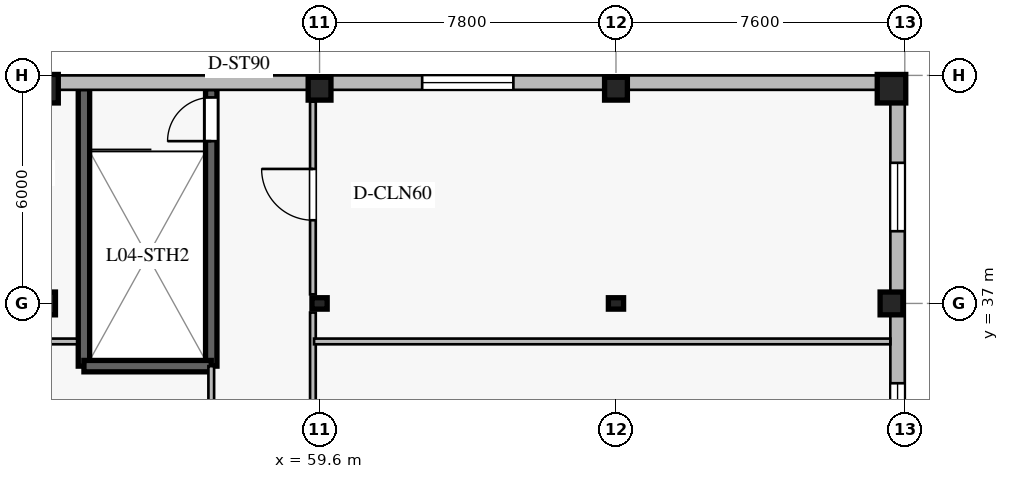
"""IFC4 building model, lengths in metres.
Left out: names, types, materials, properties, quantities, classifications, styles, units other than length and angle.
Written with IfcOpenShell. Run it as: python <this file> out.ifc"""

import sys

from ifc_helpers import new_model, si_unit, direction, frame, frame_2d, origin, origin_2d, place, context, subcontext, project, spatial, rectangle, i_section, extrude, element, fill, save


model = new_model("IFC4")
c1 = context("Model", 3, precision=1e-05, world=origin(), true_north=direction((0.0, 1.0)))
c2 = subcontext(c1, "Body", "Model", "MODEL_VIEW")
j1 = project(units=[si_unit("LENGTHUNIT", "METRE"), si_unit("PLANEANGLEUNIT", "RADIAN")], contexts=[c1])
p1 = place(None, origin())
s1 = spatial("IfcSite", under=j1, at=p1, CompositionType="ELEMENT")
p2 = place(p1, origin())
s2 = spatial("IfcBuilding", under=s1, at=p2, CompositionType="ELEMENT")
p3 = place(p2, frame((0.0, 0.0, 19.0)))
s3 = spatial("IfcBuildingStorey", under=s2, at=p3, CompositionType="ELEMENT", Elevation=19.0)
p4 = place(p3, frame((56.75, 35.35, 0.0), z_axis=(0.0, 0.0, 1.0), x_axis=(0.0, 1.0, 0.0)))
e1 = element("IfcWall", 1, at=p4, inside=s3, PredefinedType="SOLIDWALL", context=c2, shape_type="SweptSolid", body=[
    extrude(rectangle(XDim=7.3, YDim=0.3, at=frame_2d((3.65, 0.0))), origin(), (0.0, 0.0, 1.0), 4.73),
])
p5 = place(p4, frame((5.92, 0.0, 0.0)))
e2 = element("IfcOpeningElement", 2, at=p5, cuts=e1, PredefinedType="OPENING", context=c2, shape_type="SweptSolid", body=[
    extrude(rectangle(XDim=1.15, YDim=2.2, at=frame_2d((0.575, 1.1))), frame((0.0, 0.16, 0.0), z_axis=(0.0, -1.0, 0.0), x_axis=(1.0, 0.0, 0.0)), (0.0, 0.0, 1.0), 0.32),
])
p6 = place(p3, frame((53.4, 35.35, 0.0), z_axis=(0.0, 0.0, 1.0), x_axis=(0.0, 1.0, 0.0)))
e3 = element("IfcWall", 3, at=p6, inside=s3, PredefinedType="SOLIDWALL", context=c2, shape_type="SweptSolid", body=[
    extrude(rectangle(XDim=7.3, YDim=0.3, at=frame_2d((3.65, 0.0))), origin(), (0.0, 0.0, 1.0), 4.73),
])
p7 = place(p3, frame((53.4, 35.35, 0.0), z_axis=(0.0, 0.0, 1.0), x_axis=(1.0, 0.0, 0.0)))
e4 = element("IfcWall", 4, at=p7, inside=s3, PredefinedType="SOLIDWALL", context=c2, shape_type="SweptSolid", body=[
    extrude(rectangle(XDim=3.35, YDim=0.3, at=frame_2d((1.675, 0.0))), origin(), (0.0, 0.0, 1.0), 4.73),
])
p8 = place(p3, frame((52.35, 37.0, 0.0), z_axis=(0.0, 0.0, 1.0), x_axis=(1.0, 0.0, 0.0)))
e5 = element("IfcColumn", 5, at=p8, inside=s3, PredefinedType="COLUMN", context=c2, shape_type="SweptSolid", body=[
    extrude(rectangle(XDim=0.6, YDim=0.6, at=origin_2d()), origin(), (0.0, 0.0, 1.0), 4.77),
])
p9 = place(p3, frame((52.35, 42.65, 0.0), z_axis=(0.0, 0.0, 1.0), x_axis=(1.0, 0.0, 0.0)))
e6 = element("IfcColumn", 6, at=p9, inside=s3, PredefinedType="COLUMN", context=c2, shape_type="SweptSolid", body=[
    extrude(rectangle(XDim=0.75, YDim=0.75, at=origin_2d()), origin(), (0.0, 0.0, 1.0), 4.77),
])
p10 = place(p3, frame((59.6, 37.0, 0.0), z_axis=(0.0, 0.0, 1.0), x_axis=(1.0, 0.0, 0.0)))
e7 = element("IfcColumn", 7, at=p10, inside=s3, PredefinedType="COLUMN", context=c2, shape_type="SweptSolid", body=[
    extrude(i_section(OverallWidth=0.3, OverallDepth=0.4, WebThickness=0.013, FlangeThickness=0.024, at=origin_2d()), origin(), (0.0, 0.0, 1.0), 4.77),
])
p11 = place(p3, frame((59.6, 42.65, 0.0), z_axis=(0.0, 0.0, 1.0), x_axis=(1.0, 0.0, 0.0)))
e8 = element("IfcColumn", 8, at=p11, inside=s3, PredefinedType="COLUMN", context=c2, shape_type="SweptSolid", body=[
    extrude(rectangle(XDim=0.6, YDim=0.6, at=origin_2d()), origin(), (0.0, 0.0, 1.0), 4.77),
])
p12 = place(p3, frame((67.4, 37.0, 0.0), z_axis=(0.0, 0.0, 1.0), x_axis=(1.0, 0.0, 0.0)))
e9 = element("IfcColumn", 9, at=p12, inside=s3, PredefinedType="COLUMN", context=c2, shape_type="SweptSolid", body=[
    extrude(i_section(OverallWidth=0.3, OverallDepth=0.4, WebThickness=0.013, FlangeThickness=0.024, at=origin_2d()), origin(), (0.0, 0.0, 1.0), 4.77),
])
for number, where, z_axis, x_axis in (
    (10, (67.4, 42.65, 0.0), (0.0, 0.0, 1.0), (1.0, 0.0, 0.0)),
    (11, (74.65, 37.0, 0.0), (0.0, 0.0, 1.0), (1.0, 0.0, 0.0)),
):
    element("IfcColumn", number, at=place(p3, frame(where, z_axis=z_axis, x_axis=x_axis)), inside=s3, PredefinedType="COLUMN", context=c2, shape_type="SweptSolid", body=[
        extrude(rectangle(XDim=0.6, YDim=0.6, at=origin_2d()), origin(), (0.0, 0.0, 1.0), 4.77),
    ])
p13 = place(p3, frame((74.65, 42.65, 0.0), z_axis=(0.0, 0.0, 1.0), x_axis=(1.0, 0.0, 0.0)))
e12 = element("IfcColumn", 12, at=p13, inside=s3, PredefinedType="COLUMN", context=c2, shape_type="SweptSolid", body=[
    extrude(rectangle(XDim=0.75, YDim=0.75, at=origin_2d()), origin(), (0.0, 0.0, 1.0), 4.77),
])
p14 = place(p3, frame((52.0, 42.81, 0.0), z_axis=(0.0, 0.0, 1.0), x_axis=(1.0, 0.0, 0.0)))
e13 = element("IfcWall", 13, at=p14, inside=s3, PredefinedType="STANDARD", context=c2, shape_type="SweptSolid", body=[
    extrude(rectangle(XDim=23.0, YDim=0.38, at=frame_2d((11.5, 0.0))), origin(), (0.0, 0.0, 1.0), 4.73),
])
p15 = place(p14, frame((10.3, 0.0, 0.95)))
e14 = element("IfcOpeningElement", 14, at=p15, cuts=e13, PredefinedType="OPENING", context=c2, shape_type="SweptSolid", body=[
    extrude(rectangle(XDim=2.4, YDim=1.8, at=frame_2d((1.2, 0.9))), frame((0.0, 0.2, 0.0), z_axis=(0.0, -1.0, 0.0), x_axis=(1.0, 0.0, 0.0)), (0.0, 0.0, 1.0), 0.4),
])
p16 = place(p3, frame((74.81, 42.62, 0.0), z_axis=(0.0, 0.0, 1.0), x_axis=(0.0, -1.0, 0.0)))
e15 = element("IfcWall", 15, at=p16, inside=s3, PredefinedType="STANDARD", context=c2, shape_type="SweptSolid", body=[
    extrude(rectangle(XDim=35.24, YDim=0.38, at=frame_2d((17.62, 0.0))), origin(), (0.0, 0.0, 1.0), 4.73),
])
p17 = place(p16, frame((31.52, 0.0, 0.9)))
e16 = element("IfcOpeningElement", 16, at=p17, cuts=e15, PredefinedType="OPENING", context=c2, shape_type="SweptSolid", body=[
    extrude(rectangle(XDim=1.8, YDim=2.1, at=frame_2d((0.9, 1.05))), frame((0.0, 0.2, 0.0), z_axis=(0.0, -1.0, 0.0), x_axis=(1.0, 0.0, 0.0)), (0.0, 0.0, 1.0), 0.4),
])
p18 = place(p16, frame((25.72, 0.0, 0.9)))
e17 = element("IfcOpeningElement", 17, at=p18, cuts=e15, PredefinedType="OPENING", context=c2, shape_type="SweptSolid", body=[
    extrude(rectangle(XDim=1.8, YDim=2.1, at=frame_2d((0.9, 1.05))), frame((0.0, 0.2, 0.0), z_axis=(0.0, -1.0, 0.0), x_axis=(1.0, 0.0, 0.0)), (0.0, 0.0, 1.0), 0.4),
])
p19 = place(p16, frame((19.72, 0.0, 0.9)))
e18 = element("IfcOpeningElement", 18, at=p19, cuts=e15, PredefinedType="OPENING", context=c2, shape_type="SweptSolid", body=[
    extrude(rectangle(XDim=1.8, YDim=2.1, at=frame_2d((0.9, 1.05))), frame((0.0, 0.2, 0.0), z_axis=(0.0, -1.0, 0.0), x_axis=(1.0, 0.0, 0.0)), (0.0, 0.0, 1.0), 0.4),
])
p20 = place(p16, frame((13.72, 0.0, 0.9)))
e19 = element("IfcOpeningElement", 19, at=p20, cuts=e15, PredefinedType="OPENING", context=c2, shape_type="SweptSolid", body=[
    extrude(rectangle(XDim=1.8, YDim=2.1, at=frame_2d((0.9, 1.05))), frame((0.0, 0.2, 0.0), z_axis=(0.0, -1.0, 0.0), x_axis=(1.0, 0.0, 0.0)), (0.0, 0.0, 1.0), 0.4),
])
p21 = place(p16, frame((7.72, 0.0, 0.9)))
e20 = element("IfcOpeningElement", 20, at=p21, cuts=e15, PredefinedType="OPENING", context=c2, shape_type="SweptSolid", body=[
    extrude(rectangle(XDim=1.8, YDim=2.1, at=frame_2d((0.9, 1.05))), frame((0.0, 0.2, 0.0), z_axis=(0.0, -1.0, 0.0), x_axis=(1.0, 0.0, 0.0)), (0.0, 0.0, 1.0), 0.4),
])
p22 = place(p16, frame((1.92, 0.0, 0.9)))
e21 = element("IfcOpeningElement", 21, at=p22, cuts=e15, PredefinedType="OPENING", context=c2, shape_type="SweptSolid", body=[
    extrude(rectangle(XDim=1.8, YDim=2.1, at=frame_2d((0.9, 1.05))), frame((0.0, 0.2, 0.0), z_axis=(0.0, -1.0, 0.0), x_axis=(1.0, 0.0, 0.0)), (0.0, 0.0, 1.0), 0.4),
])
p23 = place(p3, frame((56.75, 14.65, 0.0), z_axis=(0.0, 0.0, 1.0), x_axis=(0.0, 1.0, 0.0)))
e22 = element("IfcWall", 22, at=p23, inside=s3, PredefinedType="PARTITIONING", context=c2, shape_type="SweptSolid", body=[
    extrude(rectangle(XDim=20.7, YDim=0.15, at=frame_2d((10.35, 0.0))), origin(), (0.0, 0.0, 1.0), 4.76),
])
p24 = place(p23, frame((9.675, 0.0, 0.0)))
e23 = element("IfcOpeningElement", 23, at=p24, cuts=e22, PredefinedType="OPENING", context=c2, shape_type="SweptSolid", body=[
    extrude(rectangle(XDim=1.35, YDim=2.2, at=frame_2d((0.675, 1.1))), frame((0.0, 0.085, 0.0), z_axis=(0.0, -1.0, 0.0), x_axis=(1.0, 0.0, 0.0)), (0.0, 0.0, 1.0), 0.17),
])
p25 = place(p3, frame((59.425, 31.24, 0.0), z_axis=(0.0, 0.0, 1.0), x_axis=(0.0, 1.0, 0.0)))
e24 = element("IfcWall", 24, at=p25, inside=s3, PredefinedType="PARTITIONING", context=c2, shape_type="SweptSolid", body=[
    extrude(rectangle(XDim=5.52, YDim=0.15, at=frame_2d((2.76, 0.0))), origin(), (0.0, 0.0, 1.0), 4.41),
])
p26 = place(p3, frame((59.425, 37.24, 0.0), z_axis=(0.0, 0.0, 1.0), x_axis=(0.0, 1.0, 0.0)))
e25 = element("IfcWall", 25, at=p26, inside=s3, PredefinedType="PARTITIONING", context=c2, shape_type="SweptSolid", body=[
    extrude(rectangle(XDim=5.07, YDim=0.15, at=frame_2d((2.535, 0.0))), origin(), (0.0, 0.0, 1.0), 4.41),
])
p27 = place(p26, frame((1.949, 0.0, 0.0)))
e26 = element("IfcOpeningElement", 26, at=p27, cuts=e25, PredefinedType="OPENING", context=c2, shape_type="SweptSolid", body=[
    extrude(rectangle(XDim=1.35, YDim=2.2, at=frame_2d((0.675, 1.1))), frame((0.0, 0.085, 0.0), z_axis=(0.0, -1.0, 0.0), x_axis=(1.0, 0.0, 0.0)), (0.0, 0.0, 1.0), 0.17),
])
p28 = place(p3, frame((52.38, 36.0, 0.0), z_axis=(0.0, 0.0, 1.0), x_axis=(1.0, 0.0, 0.0)))
e27 = element("IfcWall", 27, at=p28, inside=s3, PredefinedType="PARTITIONING", context=c2, shape_type="SweptSolid", body=[
    extrude(rectangle(XDim=0.84, YDim=0.15, at=frame_2d((0.42, 0.0))), origin(), (0.0, 0.0, 1.0), 4.41),
])
p29 = place(p3, frame((59.455, 36.0, 0.0), z_axis=(0.0, 0.0, 1.0), x_axis=(1.0, 0.0, 0.0)))
e28 = element("IfcWall", 28, at=p29, inside=s3, PredefinedType="PARTITIONING", context=c2, shape_type="SweptSolid", body=[
    extrude(rectangle(XDim=15.165, YDim=0.15, at=frame_2d((7.583, 0.0))), origin(), (0.0, 0.0, 1.0), 4.41),
])
p30 = place(p21, origin())
e29 = element("IfcWindow", 29, at=p30, inside=s3, PartitioningType="DOUBLE_PANEL_VERTICAL", PredefinedType="WINDOW", context=c2, shape_type="SweptSolid", body=[
    extrude(rectangle(XDim=1.8, YDim=2.1, at=frame_2d((0.9, 1.05))), frame((0.0, 0.03, 0.0), z_axis=(0.0, -1.0, 0.0), x_axis=(1.0, 0.0, 0.0)), (0.0, 0.0, 1.0), 0.06),
])
fill(e20, e29)
p31 = place(p22, origin())
e30 = element("IfcWindow", 30, at=p31, inside=s3, PartitioningType="DOUBLE_PANEL_VERTICAL", PredefinedType="WINDOW", context=c2, shape_type="SweptSolid", body=[
    extrude(rectangle(XDim=1.8, YDim=2.1, at=frame_2d((0.9, 1.05))), frame((0.0, 0.03, 0.0), z_axis=(0.0, -1.0, 0.0), x_axis=(1.0, 0.0, 0.0)), (0.0, 0.0, 1.0), 0.06),
])
fill(e21, e30)
p32 = place(p15, origin())
e31 = element("IfcWindow", 31, at=p32, inside=s3, PartitioningType="TRIPLE_PANEL_VERTICAL", PredefinedType="WINDOW", context=c2, shape_type="SweptSolid", body=[
    extrude(rectangle(XDim=2.4, YDim=1.8, at=frame_2d((1.2, 0.9))), frame((0.0, 0.03, 0.0), z_axis=(0.0, -1.0, 0.0), x_axis=(1.0, 0.0, 0.0)), (0.0, 0.0, 1.0), 0.06),
])
fill(e14, e31)
p33 = place(p5, origin())
e32 = element("IfcDoor", 32, at=p33, inside=s3, OperationType="SINGLE_SWING_LEFT", PredefinedType="DOOR", context=c2, shape_type="SweptSolid", body=[
    extrude(rectangle(XDim=1.15, YDim=2.2, at=frame_2d((0.575, 1.1))), frame((0.0, 0.025, 0.0), z_axis=(0.0, -1.0, 0.0), x_axis=(1.0, 0.0, 0.0)), (0.0, 0.0, 1.0), 0.05),
])
fill(e2, e32)
p34 = place(p27, origin())
e33 = element("IfcDoor", 33, at=p34, inside=s3, OperationType="SINGLE_SWING_RIGHT", PredefinedType="DOOR", context=c2, shape_type="SweptSolid", body=[
    extrude(rectangle(XDim=1.35, YDim=2.2, at=frame_2d((0.675, 1.1))), frame((0.0, 0.025, 0.0), z_axis=(0.0, -1.0, 0.0), x_axis=(1.0, 0.0, 0.0)), (0.0, 0.0, 1.0), 0.05),
])
fill(e26, e33)
save(model, sys.argv[1])
